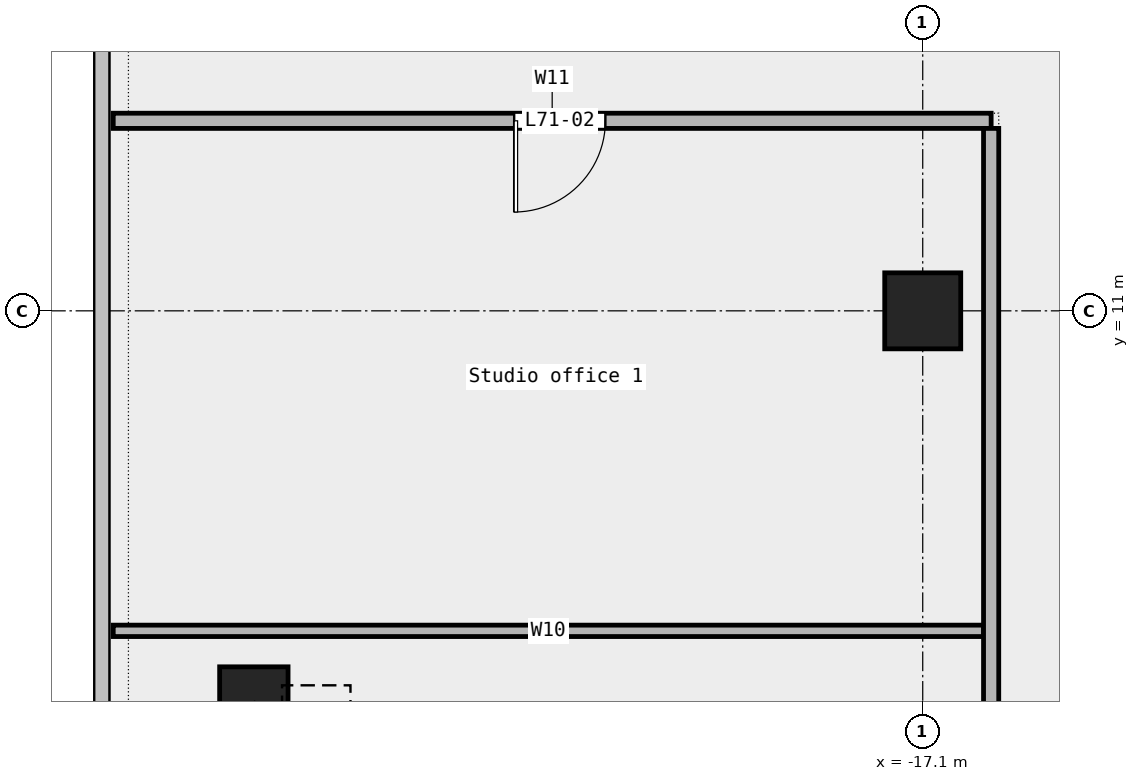
"""IFC4 building model, lengths in metres.
Left out: names, types, materials, properties, quantities, classifications, styles, units other than length and angle.
Written with IfcOpenShell. Run it as: python <this file> out.ifc"""

import sys

from ifc_helpers import new_model, si_unit, direction, frame, frame_2d, origin, origin_2d, place, context, subcontext, project, spatial, rectangle, extrude, element, fill, save


model = new_model("IFC4")
c1 = context("Model", 3, precision=1e-05, world=origin(), true_north=direction((0.0, 1.0)))
c2 = subcontext(c1, "Body", "Model", "MODEL_VIEW")
j1 = project(units=[si_unit("LENGTHUNIT", "METRE"), si_unit("PLANEANGLEUNIT", "RADIAN")], contexts=[c1])
p1 = place(None, origin())
s1 = spatial("IfcSite", under=j1, at=p1, CompositionType="ELEMENT")
p2 = place(p1, origin())
s2 = spatial("IfcBuilding", under=s1, at=p2, CompositionType="ELEMENT")
p3 = place(p2, frame((0.0, 0.0, 325.4)))
s3 = spatial("IfcBuildingStorey", under=s2, at=p3, CompositionType="ELEMENT", Elevation=325.4)
p4 = place(p3, frame((-25.9, 5.867, 0.0), z_axis=(0.218989598564, -0.064856865944, 0.973569279847), x_axis=(0.283971837833, 0.958832621117, 0.0)))
e1 = element("IfcColumn", 1, at=p4, inside=s3, PredefinedType="COLUMN", context=c2, shape_type="SweptSolid", body=[
    extrude(rectangle(XDim=0.9, YDim=0.9, at=origin_2d()), origin(), (0.0, 0.0, 1.0), 3.749),
])
p5 = place(p3, frame((-17.1, 11.0, 0.0), z_axis=(0.0, 0.0, 1.0), x_axis=(1.0, 0.0, 0.0)))
e2 = element("IfcColumn", 2, at=p5, inside=s3, PredefinedType="COLUMN", context=c2, shape_type="SweptSolid", body=[
    extrude(rectangle(XDim=1.0, YDim=1.0, at=origin_2d()), origin(), (0.0, 0.0, 1.0), 3.65),
])
p6 = place(p3, frame((-27.75, 6.79, 0.0), z_axis=(0.0, 0.0, 1.0), x_axis=(1.0, 0.0, 0.0)))
e3 = element("IfcWall", 3, at=p6, inside=s3, PredefinedType="PARTITIONING", context=c2, shape_type="SweptSolid", body=[
    extrude(rectangle(XDim=11.45, YDim=0.15, at=frame_2d((5.725, 0.0))), origin(), (0.0, 0.0, 1.0), 3.65),
])
p7 = place(p3, frame((-27.75, 13.5, 0.0), z_axis=(0.0, 0.0, 1.0), x_axis=(1.0, 0.0, 0.0)))
e4 = element("IfcWall", 4, at=p7, inside=s3, PredefinedType="PARTITIONING", context=c2, shape_type="SweptSolid", body=[
    extrude(rectangle(XDim=11.55, YDim=0.2, at=frame_2d((5.775, 0.0))), origin(), (0.0, 0.0, 1.0), 3.65),
])
p8 = place(p7, frame((5.275, 0.0, 0.0)))
e5 = element("IfcOpeningElement", 5, at=p8, cuts=e4, PredefinedType="OPENING", context=c2, shape_type="SweptSolid", body=[
    extrude(rectangle(XDim=1.2, YDim=2.1, at=frame_2d((0.6, 1.05))), frame((0.0, 0.112, 0.0), z_axis=(0.0, -1.0, 0.0), x_axis=(1.0, 0.0, 0.0)), (0.0, 0.0, 1.0), 0.224),
])
p9 = place(p3, frame((-16.2, -7.1, 0.0), z_axis=(0.0, 0.0, 1.0), x_axis=(0.0, 1.0, 0.0)))
e6 = element("IfcWall", 6, at=p9, inside=s3, PredefinedType="PARTITIONING", context=c2, shape_type="SweptSolid", body=[
    extrude(rectangle(XDim=20.5, YDim=0.2, at=frame_2d((10.25, 0.0))), origin(), (0.0, 0.0, 1.0), 3.65),
])
p10 = place(p9, frame((10.4, 0.0, 0.0)))
e7 = element("IfcOpeningElement", 7, at=p10, cuts=e6, PredefinedType="OPENING", context=c2, shape_type="SweptSolid", body=[
    extrude(rectangle(XDim=1.2, YDim=2.1, at=frame_2d((0.6, 1.05))), frame((0.0, 0.112, 0.0), z_axis=(0.0, -1.0, 0.0), x_axis=(1.0, 0.0, 0.0)), (0.0, 0.0, 1.0), 0.224),
])
p11 = place(p8, origin())
e8 = element("IfcDoor", 8, at=p11, inside=s3, OperationType="SINGLE_SWING_RIGHT", PredefinedType="DOOR", context=c2, shape_type="SweptSolid", body=[
    extrude(rectangle(XDim=1.2, YDim=2.1, at=frame_2d((0.6, 1.05))), frame((0.0, 0.025, 0.0), z_axis=(0.0, -1.0, 0.0), x_axis=(1.0, 0.0, 0.0)), (0.0, 0.0, 1.0), 0.05),
])
fill(e5, e8)
save(model, sys.argv[1])
